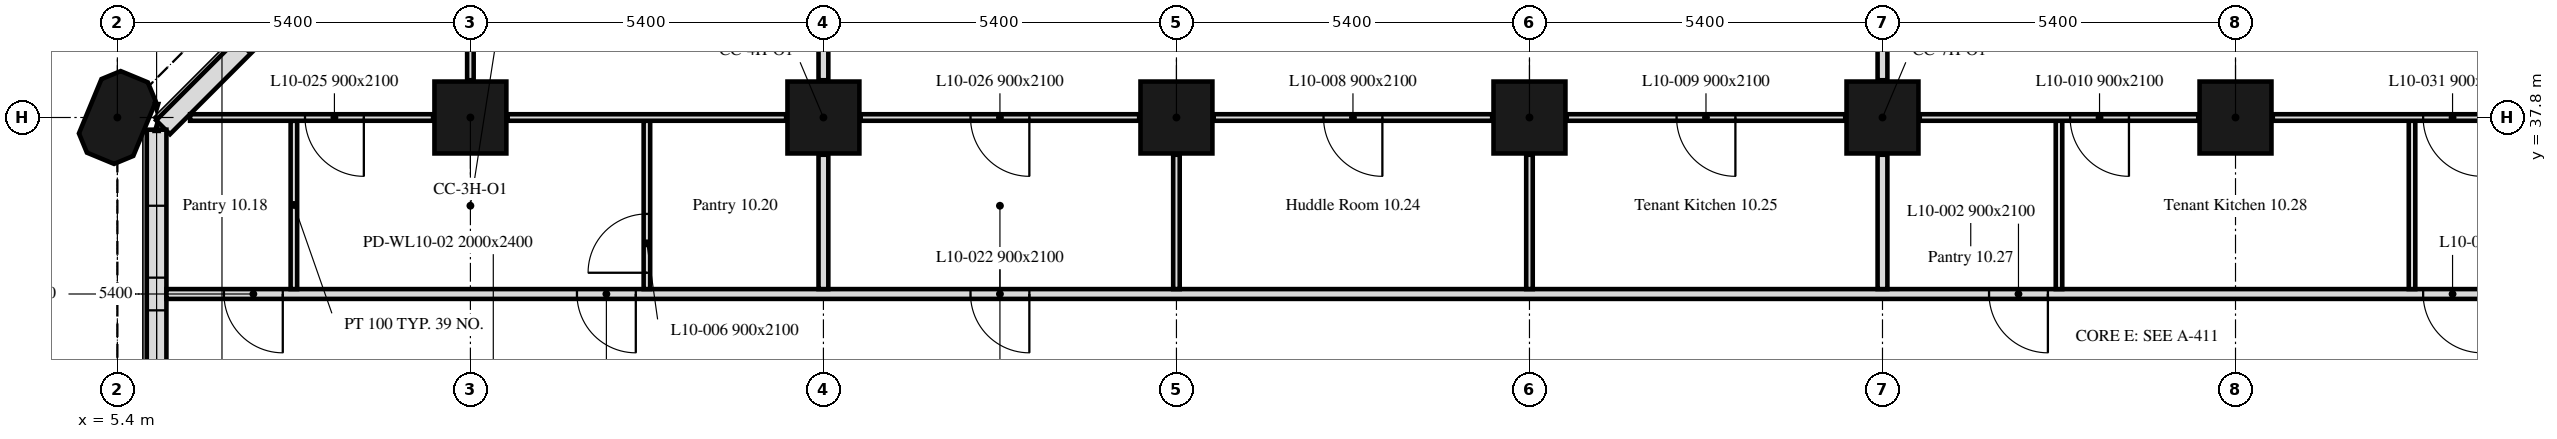
"""IFC4 building model, lengths in metres.
Left out: names, types, materials, properties, quantities, classifications, styles, units other than length and angle.
Written with IfcOpenShell. Run it as: python <this file> out.ifc"""

import sys

from ifc_helpers import new_model, si_unit, direction, frame, frame_2d, origin, origin_2d, place, context, subcontext, project, spatial, polyline, rectangle, outline, extrude, element, fill, save


model = new_model("IFC4")
c1 = context("Model", 3, precision=1e-05, world=origin(), true_north=direction((0.0, 1.0)))
c2 = subcontext(c1, "Body", "Model", "MODEL_VIEW")
j1 = project(units=[si_unit("LENGTHUNIT", "METRE"), si_unit("PLANEANGLEUNIT", "RADIAN")], contexts=[c1])
p1 = place(None, origin())
s1 = spatial("IfcSite", under=j1, at=p1, CompositionType="ELEMENT")
p2 = place(p1, origin())
s2 = spatial("IfcBuilding", under=s1, at=p2, CompositionType="ELEMENT")
p3 = place(p2, frame((0.0, 0.0, 48.8)))
s3 = spatial("IfcBuildingStorey", under=s2, at=p3, CompositionType="ELEMENT", Elevation=48.8)
p4 = place(p3, frame((5.4, 37.8, 0.0), z_axis=(0.0, 0.0, 1.0), x_axis=(0.382683432365, 0.923879532511, 0.0)))
e1 = element("IfcColumn", 1, at=p4, inside=s3, PredefinedType="COLUMN", context=c2, shape_type="SweptSolid", body=[
    extrude(outline(polyline([(-0.45, -0.45), (0.45, -0.45), (0.675, -0.225), (0.675, 0.225), (0.45, 0.45), (-0.45, 0.45), (-0.675, 0.225), (-0.675, -0.225), (-0.45, -0.45)])), origin(), (0.0, 0.0, 1.0), 3.5),
])
for number, where, z_axis, x_axis in (
    (2, (10.8, 37.8, 0.0), (0.0, 0.0, 1.0), (1.0, 0.0, 0.0)),
    (3, (16.2, 37.8, 0.0), (0.0, 0.0, 1.0), (1.0, 0.0, 0.0)),
    (4, (21.6, 37.8, 0.0), (0.0, 0.0, 1.0), (1.0, 0.0, 0.0)),
    (5, (27.0, 37.8, 0.0), (0.0, 0.0, 1.0), (1.0, 0.0, 0.0)),
    (6, (32.4, 37.8, 0.0), (0.0, 0.0, 1.0), (1.0, 0.0, 0.0)),
    (7, (37.8, 37.8, 0.0), (0.0, 0.0, 1.0), (1.0, 0.0, 0.0)),
):
    element("IfcColumn", number, at=place(p3, frame(where, z_axis=z_axis, x_axis=x_axis)), inside=s3, PredefinedType="COLUMN", context=c2, shape_type="SweptSolid", body=[
        extrude(rectangle(XDim=1.1, YDim=1.1, at=origin_2d()), origin(), (0.0, 0.0, 1.0), 3.5),
    ])
p5 = place(p3, frame((10.949, 42.501, 0.0), z_axis=(0.0, 0.0, 1.0), x_axis=(-0.707106781187, -0.707106781187, 0.0)))
e8 = element("IfcWall", 8, at=p5, inside=s3, PredefinedType="SOLIDWALL", context=c2, shape_type="SweptSolid", body=[
    extrude(rectangle(XDim=6.86, YDim=0.3, at=frame_2d((3.43, 0.0))), origin(), (0.0, 0.0, 1.0), 3.5),
])
p6 = place(p5, frame((1.73, 0.0, 0.9)))
e9 = element("IfcOpeningElement", 9, at=p6, cuts=e8, PredefinedType="OPENING", context=c2, shape_type="SweptSolid", body=[
    extrude(rectangle(XDim=3.4, YDim=1.7, at=frame_2d((1.7, 0.85))), frame((0.0, 0.16, 0.0), z_axis=(0.0, -1.0, 0.0), x_axis=(1.0, 0.0, 0.0)), (0.0, 0.0, 1.0), 0.32),
])
p7 = place(p3, frame((6.0, 37.614, 0.0), z_axis=(0.0, 0.0, 1.0), x_axis=(0.0, -1.0, 0.0)))
e10 = element("IfcWall", 10, at=p7, inside=s3, PredefinedType="SOLIDWALL", context=c2, shape_type="SweptSolid", body=[
    extrude(rectangle(XDim=5.214, YDim=0.3, at=frame_2d((2.607, 0.0))), origin(), (0.0, 0.0, 1.0), 3.5),
])
p8 = place(p7, frame((1.164, 0.0, 0.9)))
e11 = element("IfcOpeningElement", 11, at=p8, cuts=e10, PredefinedType="OPENING", context=c2, shape_type="SweptSolid", body=[
    extrude(rectangle(XDim=1.1, YDim=1.7, at=frame_2d((0.55, 0.85))), frame((0.0, 0.16, 0.0), z_axis=(0.0, -1.0, 0.0), x_axis=(1.0, 0.0, 0.0)), (0.0, 0.0, 1.0), 0.32),
])
p9 = place(p7, frame((2.764, 0.0, 0.9)))
e12 = element("IfcOpeningElement", 12, at=p9, cuts=e10, PredefinedType="OPENING", context=c2, shape_type="SweptSolid", body=[
    extrude(rectangle(XDim=1.1, YDim=1.7, at=frame_2d((0.55, 0.85))), frame((0.0, 0.16, 0.0), z_axis=(0.0, -1.0, 0.0), x_axis=(1.0, 0.0, 0.0)), (0.0, 0.0, 1.0), 0.32),
])
p10 = place(p3, frame((47.849, 35.1, 0.0), z_axis=(0.0, 0.0, 1.0), x_axis=(-1.0, 0.0, 0.0)))
e13 = element("IfcWall", 13, at=p10, inside=s3, PredefinedType="PARTITIONING", context=c2, shape_type="SweptSolid", body=[
    extrude(rectangle(XDim=41.698, YDim=0.15, at=frame_2d((20.849, 0.0))), origin(), (0.0, 0.0, 1.0), 3.5),
])
p11 = place(p10, frame((39.919, 0.0, 0.0)))
e14 = element("IfcOpeningElement", 14, at=p11, cuts=e13, PredefinedType="OPENING", context=c2, shape_type="SweptSolid", body=[
    extrude(rectangle(XDim=0.9, YDim=2.1, at=frame_2d((0.45, 1.05))), frame((0.0, 0.075, 0.0), z_axis=(0.0, -1.0, 0.0), x_axis=(1.0, 0.0, 0.0)), (0.0, 0.0, 1.0), 0.15),
])
p12 = place(p10, frame((12.919, 0.0, 0.0)))
e15 = element("IfcOpeningElement", 15, at=p12, cuts=e13, PredefinedType="OPENING", context=c2, shape_type="SweptSolid", body=[
    extrude(rectangle(XDim=0.9, YDim=2.1, at=frame_2d((0.45, 1.05))), frame((0.0, 0.075, 0.0), z_axis=(0.0, -1.0, 0.0), x_axis=(1.0, 0.0, 0.0)), (0.0, 0.0, 1.0), 0.15),
])
p13 = place(p10, frame((28.499, 0.0, 0.0)))
e16 = element("IfcOpeningElement", 16, at=p13, cuts=e13, PredefinedType="OPENING", context=c2, shape_type="SweptSolid", body=[
    extrude(rectangle(XDim=0.9, YDim=2.1, at=frame_2d((0.45, 1.05))), frame((0.0, 0.075, 0.0), z_axis=(0.0, -1.0, 0.0), x_axis=(1.0, 0.0, 0.0)), (0.0, 0.0, 1.0), 0.15),
])
p14 = place(p10, frame((34.519, 0.0, 0.0)))
e17 = element("IfcOpeningElement", 17, at=p14, cuts=e13, PredefinedType="OPENING", context=c2, shape_type="SweptSolid", body=[
    extrude(rectangle(XDim=0.9, YDim=2.1, at=frame_2d((0.45, 1.05))), frame((0.0, 0.075, 0.0), z_axis=(0.0, -1.0, 0.0), x_axis=(1.0, 0.0, 0.0)), (0.0, 0.0, 1.0), 0.15),
])
p15 = place(p10, frame((6.279, 0.0, 0.0)))
e18 = element("IfcOpeningElement", 18, at=p15, cuts=e13, PredefinedType="OPENING", context=c2, shape_type="SweptSolid", body=[
    extrude(rectangle(XDim=0.9, YDim=2.1, at=frame_2d((0.45, 1.05))), frame((0.0, 0.075, 0.0), z_axis=(0.0, -1.0, 0.0), x_axis=(1.0, 0.0, 0.0)), (0.0, 0.0, 1.0), 0.15),
])
p16 = place(p3, frame((8.1, 35.175, 0.0), z_axis=(0.0, 0.0, 1.0), x_axis=(0.0, 1.0, 0.0)))
e19 = element("IfcWall", 19, at=p16, inside=s3, PredefinedType="PARTITIONING", context=c2, shape_type="SweptSolid", body=[
    extrude(rectangle(XDim=2.575, YDim=0.1, at=frame_2d((1.288, 0.0))), origin(), (0.0, 0.0, 1.0), 3.5),
])
p17 = place(p3, frame((13.5, 35.175, 0.0), z_axis=(0.0, 0.0, 1.0), x_axis=(0.0, 1.0, 0.0)))
e20 = element("IfcWall", 20, at=p17, inside=s3, PredefinedType="PARTITIONING", context=c2, shape_type="SweptSolid", body=[
    extrude(rectangle(XDim=2.575, YDim=0.1, at=frame_2d((1.288, 0.0))), origin(), (0.0, 0.0, 1.0), 3.5),
])
p18 = place(p17, frame((0.25, 0.0, 0.0)))
e21 = element("IfcOpeningElement", 21, at=p18, cuts=e20, PredefinedType="OPENING", context=c2, shape_type="SweptSolid", body=[
    extrude(rectangle(XDim=0.9, YDim=2.1, at=frame_2d((0.45, 1.05))), frame((0.0, 0.05, 0.0), z_axis=(0.0, -1.0, 0.0), x_axis=(1.0, 0.0, 0.0)), (0.0, 0.0, 1.0), 0.1),
])
p19 = place(p3, frame((10.23, 37.8, 0.0), z_axis=(0.0, 0.0, 1.0), x_axis=(-1.0, 0.0, 0.0)))
e22 = element("IfcWall", 22, at=p19, inside=s3, PredefinedType="PARTITIONING", context=c2, shape_type="SweptSolid", body=[
    extrude(rectangle(XDim=3.718, YDim=0.1, at=frame_2d((1.859, 0.0))), origin(), (0.0, 0.0, 1.0), 3.5),
])
p20 = place(p19, frame((1.06, 0.0, 0.0)))
e23 = element("IfcOpeningElement", 23, at=p20, cuts=e22, PredefinedType="OPENING", context=c2, shape_type="SweptSolid", body=[
    extrude(rectangle(XDim=0.9, YDim=2.1, at=frame_2d((0.45, 1.05))), frame((0.0, 0.05, 0.0), z_axis=(0.0, -1.0, 0.0), x_axis=(1.0, 0.0, 0.0)), (0.0, 0.0, 1.0), 0.1),
])
p21 = place(p3, frame((16.2, 35.175, 0.0), z_axis=(0.0, 0.0, 1.0), x_axis=(0.0, 1.0, 0.0)))
e24 = element("IfcWall", 24, at=p21, inside=s3, PredefinedType="PARTITIONING", context=c2, shape_type="SweptSolid", body=[
    extrude(rectangle(XDim=2.055, YDim=0.15, at=frame_2d((1.027, 0.0))), origin(), (0.0, 0.0, 1.0), 3.5),
])
p22 = place(p3, frame((15.63, 37.8, 0.0), z_axis=(0.0, 0.0, 1.0), x_axis=(-1.0, 0.0, 0.0)))
e25 = element("IfcWall", 25, at=p22, inside=s3, PredefinedType="PARTITIONING", context=c2, shape_type="SweptSolid", body=[
    extrude(rectangle(XDim=4.26, YDim=0.1, at=frame_2d((2.13, 0.0))), origin(), (0.0, 0.0, 1.0), 3.5),
])
p23 = place(p3, frame((10.8, 38.37, 0.0), z_axis=(0.0, 0.0, 1.0), x_axis=(0.0, 1.0, 0.0)))
e26 = element("IfcWall", 26, at=p23, inside=s3, PredefinedType="PARTITIONING", context=c2, shape_type="SweptSolid", body=[
    extrude(rectangle(XDim=3.718, YDim=0.1, at=frame_2d((1.859, 0.0))), origin(), (0.0, 0.0, 1.0), 3.5),
])
p24 = place(p23, frame((1.23, 0.0, 0.0)))
e27 = element("IfcOpeningElement", 27, at=p24, cuts=e26, PredefinedType="OPENING", context=c2, shape_type="SweptSolid", body=[
    extrude(rectangle(XDim=0.9, YDim=2.1, at=frame_2d((0.45, 1.05))), frame((0.0, 0.05, 0.0), z_axis=(0.0, -1.0, 0.0), x_axis=(1.0, 0.0, 0.0)), (0.0, 0.0, 1.0), 0.1),
])
p25 = place(p3, frame((16.2, 38.37, 0.0), z_axis=(0.0, 0.0, 1.0), x_axis=(0.0, 1.0, 0.0)))
e28 = element("IfcWall", 28, at=p25, inside=s3, PredefinedType="PARTITIONING", context=c2, shape_type="SweptSolid", body=[
    extrude(rectangle(XDim=4.079, YDim=0.15, at=frame_2d((2.04, 0.0))), origin(), (0.0, 0.0, 1.0), 3.5),
])
p26 = place(p3, frame((21.6, 35.175, 0.0), z_axis=(0.0, 0.0, 1.0), x_axis=(0.0, 1.0, 0.0)))
e29 = element("IfcWall", 29, at=p26, inside=s3, PredefinedType="PARTITIONING", context=c2, shape_type="SweptSolid", body=[
    extrude(rectangle(XDim=2.055, YDim=0.1, at=frame_2d((1.027, 0.0))), origin(), (0.0, 0.0, 1.0), 3.5),
])
p27 = place(p3, frame((21.03, 37.8, 0.0), z_axis=(0.0, 0.0, 1.0), x_axis=(-1.0, 0.0, 0.0)))
e30 = element("IfcWall", 30, at=p27, inside=s3, PredefinedType="PARTITIONING", context=c2, shape_type="SweptSolid", body=[
    extrude(rectangle(XDim=4.26, YDim=0.1, at=frame_2d((2.13, 0.0))), origin(), (0.0, 0.0, 1.0), 3.5),
])
p28 = place(p27, frame((1.68, 0.0, 0.0)))
e31 = element("IfcOpeningElement", 31, at=p28, cuts=e30, PredefinedType="OPENING", context=c2, shape_type="SweptSolid", body=[
    extrude(rectangle(XDim=0.9, YDim=2.1, at=frame_2d((0.45, 1.05))), frame((0.0, 0.05, 0.0), z_axis=(0.0, -1.0, 0.0), x_axis=(1.0, 0.0, 0.0)), (0.0, 0.0, 1.0), 0.1),
])
p29 = place(p3, frame((27.0, 35.175, 0.0), z_axis=(0.0, 0.0, 1.0), x_axis=(0.0, 1.0, 0.0)))
e32 = element("IfcWall", 32, at=p29, inside=s3, PredefinedType="PARTITIONING", context=c2, shape_type="SweptSolid", body=[
    extrude(rectangle(XDim=2.055, YDim=0.1, at=frame_2d((1.027, 0.0))), origin(), (0.0, 0.0, 1.0), 3.5),
])
p30 = place(p3, frame((26.43, 37.8, 0.0), z_axis=(0.0, 0.0, 1.0), x_axis=(-1.0, 0.0, 0.0)))
e33 = element("IfcWall", 33, at=p30, inside=s3, PredefinedType="PARTITIONING", context=c2, shape_type="SweptSolid", body=[
    extrude(rectangle(XDim=4.26, YDim=0.1, at=frame_2d((2.13, 0.0))), origin(), (0.0, 0.0, 1.0), 3.5),
])
p31 = place(p30, frame((1.68, 0.0, 0.0)))
e34 = element("IfcOpeningElement", 34, at=p31, cuts=e33, PredefinedType="OPENING", context=c2, shape_type="SweptSolid", body=[
    extrude(rectangle(XDim=0.9, YDim=2.1, at=frame_2d((0.45, 1.05))), frame((0.0, 0.05, 0.0), z_axis=(0.0, -1.0, 0.0), x_axis=(1.0, 0.0, 0.0)), (0.0, 0.0, 1.0), 0.1),
])
p32 = place(p3, frame((32.4, 35.175, 0.0), z_axis=(0.0, 0.0, 1.0), x_axis=(0.0, 1.0, 0.0)))
e35 = element("IfcWall", 35, at=p32, inside=s3, PredefinedType="PARTITIONING", context=c2, shape_type="SweptSolid", body=[
    extrude(rectangle(XDim=2.055, YDim=0.15, at=frame_2d((1.027, 0.0))), origin(), (0.0, 0.0, 1.0), 3.5),
])
p33 = place(p3, frame((31.83, 37.8, 0.0), z_axis=(0.0, 0.0, 1.0), x_axis=(-1.0, 0.0, 0.0)))
e36 = element("IfcWall", 36, at=p33, inside=s3, PredefinedType="PARTITIONING", context=c2, shape_type="SweptSolid", body=[
    extrude(rectangle(XDim=4.26, YDim=0.1, at=frame_2d((2.13, 0.0))), origin(), (0.0, 0.0, 1.0), 3.5),
])
p34 = place(p33, frame((1.68, 0.0, 0.0)))
e37 = element("IfcOpeningElement", 37, at=p34, cuts=e36, PredefinedType="OPENING", context=c2, shape_type="SweptSolid", body=[
    extrude(rectangle(XDim=0.9, YDim=2.1, at=frame_2d((0.45, 1.05))), frame((0.0, 0.05, 0.0), z_axis=(0.0, -1.0, 0.0), x_axis=(1.0, 0.0, 0.0)), (0.0, 0.0, 1.0), 0.1),
])
p35 = place(p3, frame((32.4, 38.37, 0.0), z_axis=(0.0, 0.0, 1.0), x_axis=(0.0, 1.0, 0.0)))
e38 = element("IfcWall", 38, at=p35, inside=s3, PredefinedType="PARTITIONING", context=c2, shape_type="SweptSolid", body=[
    extrude(rectangle(XDim=4.079, YDim=0.15, at=frame_2d((2.04, 0.0))), origin(), (0.0, 0.0, 1.0), 3.5),
])
for number, where, z_axis, x_axis in (
    (39, (35.1, 35.175, 0.0), (0.0, 0.0, 1.0), (0.0, 1.0, 0.0)),
    (40, (40.5, 35.175, 0.0), (0.0, 0.0, 1.0), (0.0, 1.0, 0.0)),
):
    element("IfcWall", number, at=place(p3, frame(where, z_axis=z_axis, x_axis=x_axis)), inside=s3, PredefinedType="PARTITIONING", context=c2, shape_type="SweptSolid", body=[
        extrude(rectangle(XDim=2.575, YDim=0.1, at=frame_2d((1.288, 0.0))), origin(), (0.0, 0.0, 1.0), 3.5),
    ])
p36 = place(p3, frame((37.23, 37.8, 0.0), z_axis=(0.0, 0.0, 1.0), x_axis=(-1.0, 0.0, 0.0)))
e41 = element("IfcWall", 41, at=p36, inside=s3, PredefinedType="PARTITIONING", context=c2, shape_type="SweptSolid", body=[
    extrude(rectangle(XDim=4.26, YDim=0.1, at=frame_2d((2.13, 0.0))), origin(), (0.0, 0.0, 1.0), 3.5),
])
p37 = place(p36, frame((1.06, 0.0, 0.0)))
e42 = element("IfcOpeningElement", 42, at=p37, cuts=e41, PredefinedType="OPENING", context=c2, shape_type="SweptSolid", body=[
    extrude(rectangle(XDim=0.9, YDim=2.1, at=frame_2d((0.45, 1.05))), frame((0.0, 0.05, 0.0), z_axis=(0.0, -1.0, 0.0), x_axis=(1.0, 0.0, 0.0)), (0.0, 0.0, 1.0), 0.1),
])
p38 = place(p3, frame((42.63, 37.8, 0.0), z_axis=(0.0, 0.0, 1.0), x_axis=(-1.0, 0.0, 0.0)))
e43 = element("IfcWall", 43, at=p38, inside=s3, PredefinedType="PARTITIONING", context=c2, shape_type="SweptSolid", body=[
    extrude(rectangle(XDim=4.26, YDim=0.1, at=frame_2d((2.13, 0.0))), origin(), (0.0, 0.0, 1.0), 3.5),
])
p39 = place(p38, frame((1.06, 0.0, 0.0)))
e44 = element("IfcOpeningElement", 44, at=p39, cuts=e43, PredefinedType="OPENING", context=c2, shape_type="SweptSolid", body=[
    extrude(rectangle(XDim=0.9, YDim=2.1, at=frame_2d((0.45, 1.05))), frame((0.0, 0.05, 0.0), z_axis=(0.0, -1.0, 0.0), x_axis=(1.0, 0.0, 0.0)), (0.0, 0.0, 1.0), 0.1),
])
p40 = place(p8, origin())
e45 = element("IfcWindow", 45, at=p40, inside=s3, PartitioningType="SINGLE_PANEL", PredefinedType="WINDOW", context=c2, shape_type="SweptSolid", body=[
    extrude(rectangle(XDim=1.1, YDim=1.7, at=frame_2d((0.55, 0.85))), frame((0.0, 0.03, 0.0), z_axis=(0.0, -1.0, 0.0), x_axis=(1.0, 0.0, 0.0)), (0.0, 0.0, 1.0), 0.06),
])
fill(e11, e45)
p41 = place(p9, origin())
e46 = element("IfcWindow", 46, at=p41, inside=s3, PartitioningType="SINGLE_PANEL", PredefinedType="WINDOW", context=c2, shape_type="SweptSolid", body=[
    extrude(rectangle(XDim=1.1, YDim=1.7, at=frame_2d((0.55, 0.85))), frame((0.0, 0.03, 0.0), z_axis=(0.0, -1.0, 0.0), x_axis=(1.0, 0.0, 0.0)), (0.0, 0.0, 1.0), 0.06),
])
fill(e12, e46)
p42 = place(p11, origin())
e47 = element("IfcDoor", 47, at=p42, inside=s3, OperationType="SINGLE_SWING_LEFT", PredefinedType="DOOR", context=c2, shape_type="SweptSolid", body=[
    extrude(rectangle(XDim=0.9, YDim=2.1, at=frame_2d((0.45, 1.05))), frame((0.0, 0.025, 0.0), z_axis=(0.0, -1.0, 0.0), x_axis=(1.0, 0.0, 0.0)), (0.0, 0.0, 1.0), 0.05),
])
fill(e14, e47)
p43 = place(p12, origin())
e48 = element("IfcDoor", 48, at=p43, inside=s3, OperationType="SINGLE_SWING_LEFT", PredefinedType="DOOR", context=c2, shape_type="SweptSolid", body=[
    extrude(rectangle(XDim=0.9, YDim=2.1, at=frame_2d((0.45, 1.05))), frame((0.0, 0.025, 0.0), z_axis=(0.0, -1.0, 0.0), x_axis=(1.0, 0.0, 0.0)), (0.0, 0.0, 1.0), 0.05),
])
fill(e15, e48)
p44 = place(p18, origin())
e49 = element("IfcDoor", 49, at=p44, inside=s3, OperationType="SINGLE_SWING_RIGHT", PredefinedType="DOOR", context=c2, shape_type="SweptSolid", body=[
    extrude(rectangle(XDim=0.9, YDim=2.1, at=frame_2d((0.45, 1.05))), frame((0.0, 0.025, 0.0), z_axis=(0.0, -1.0, 0.0), x_axis=(1.0, 0.0, 0.0)), (0.0, 0.0, 1.0), 0.05),
])
fill(e21, e49)
p45 = place(p31, origin())
e50 = element("IfcDoor", 50, at=p45, inside=s3, OperationType="SINGLE_SWING_RIGHT", PredefinedType="DOOR", context=c2, shape_type="SweptSolid", body=[
    extrude(rectangle(XDim=0.9, YDim=2.1, at=frame_2d((0.45, 1.05))), frame((0.0, 0.025, 0.0), z_axis=(0.0, -1.0, 0.0), x_axis=(1.0, 0.0, 0.0)), (0.0, 0.0, 1.0), 0.05),
])
fill(e34, e50)
p46 = place(p34, origin())
e51 = element("IfcDoor", 51, at=p46, inside=s3, OperationType="SINGLE_SWING_RIGHT", PredefinedType="DOOR", context=c2, shape_type="SweptSolid", body=[
    extrude(rectangle(XDim=0.9, YDim=2.1, at=frame_2d((0.45, 1.05))), frame((0.0, 0.025, 0.0), z_axis=(0.0, -1.0, 0.0), x_axis=(1.0, 0.0, 0.0)), (0.0, 0.0, 1.0), 0.05),
])
fill(e37, e51)
p47 = place(p37, origin())
e52 = element("IfcDoor", 52, at=p47, inside=s3, OperationType="SINGLE_SWING_LEFT", PredefinedType="DOOR", context=c2, shape_type="SweptSolid", body=[
    extrude(rectangle(XDim=0.9, YDim=2.1, at=frame_2d((0.45, 1.05))), frame((0.0, 0.025, 0.0), z_axis=(0.0, -1.0, 0.0), x_axis=(1.0, 0.0, 0.0)), (0.0, 0.0, 1.0), 0.05),
])
fill(e42, e52)
p48 = place(p13, origin())
e53 = element("IfcDoor", 53, at=p48, inside=s3, OperationType="SINGLE_SWING_LEFT", PredefinedType="DOOR", context=c2, shape_type="SweptSolid", body=[
    extrude(rectangle(XDim=0.9, YDim=2.1, at=frame_2d((0.45, 1.05))), frame((0.0, 0.025, 0.0), z_axis=(0.0, -1.0, 0.0), x_axis=(1.0, 0.0, 0.0)), (0.0, 0.0, 1.0), 0.05),
])
fill(e16, e53)
p49 = place(p20, origin())
e54 = element("IfcDoor", 54, at=p49, inside=s3, OperationType="SINGLE_SWING_LEFT", PredefinedType="DOOR", context=c2, shape_type="SweptSolid", body=[
    extrude(rectangle(XDim=0.9, YDim=2.1, at=frame_2d((0.45, 1.05))), frame((0.0, 0.025, 0.0), z_axis=(0.0, -1.0, 0.0), x_axis=(1.0, 0.0, 0.0)), (0.0, 0.0, 1.0), 0.05),
])
fill(e23, e54)
p50 = place(p28, origin())
e55 = element("IfcDoor", 55, at=p50, inside=s3, OperationType="SINGLE_SWING_LEFT", PredefinedType="DOOR", context=c2, shape_type="SweptSolid", body=[
    extrude(rectangle(XDim=0.9, YDim=2.1, at=frame_2d((0.45, 1.05))), frame((0.0, 0.025, 0.0), z_axis=(0.0, -1.0, 0.0), x_axis=(1.0, 0.0, 0.0)), (0.0, 0.0, 1.0), 0.05),
])
fill(e31, e55)
p51 = place(p14, origin())
e56 = element("IfcDoor", 56, at=p51, inside=s3, OperationType="SINGLE_SWING_LEFT", PredefinedType="DOOR", context=c2, shape_type="SweptSolid", body=[
    extrude(rectangle(XDim=0.9, YDim=2.1, at=frame_2d((0.45, 1.05))), frame((0.0, 0.025, 0.0), z_axis=(0.0, -1.0, 0.0), x_axis=(1.0, 0.0, 0.0)), (0.0, 0.0, 1.0), 0.05),
])
fill(e17, e56)
p52 = place(p15, origin())
e57 = element("IfcDoor", 57, at=p52, inside=s3, OperationType="SINGLE_SWING_LEFT", PredefinedType="DOOR", context=c2, shape_type="SweptSolid", body=[
    extrude(rectangle(XDim=0.9, YDim=2.1, at=frame_2d((0.45, 1.05))), frame((0.0, 0.025, 0.0), z_axis=(0.0, -1.0, 0.0), x_axis=(1.0, 0.0, 0.0)), (0.0, 0.0, 1.0), 0.05),
])
fill(e18, e57)
p53 = place(p39, origin())
e58 = element("IfcDoor", 58, at=p53, inside=s3, OperationType="SINGLE_SWING_LEFT", PredefinedType="DOOR", context=c2, shape_type="SweptSolid", body=[
    extrude(rectangle(XDim=0.9, YDim=2.1, at=frame_2d((0.45, 1.05))), frame((0.0, 0.025, 0.0), z_axis=(0.0, -1.0, 0.0), x_axis=(1.0, 0.0, 0.0)), (0.0, 0.0, 1.0), 0.05),
])
fill(e44, e58)
save(model, sys.argv[1])
